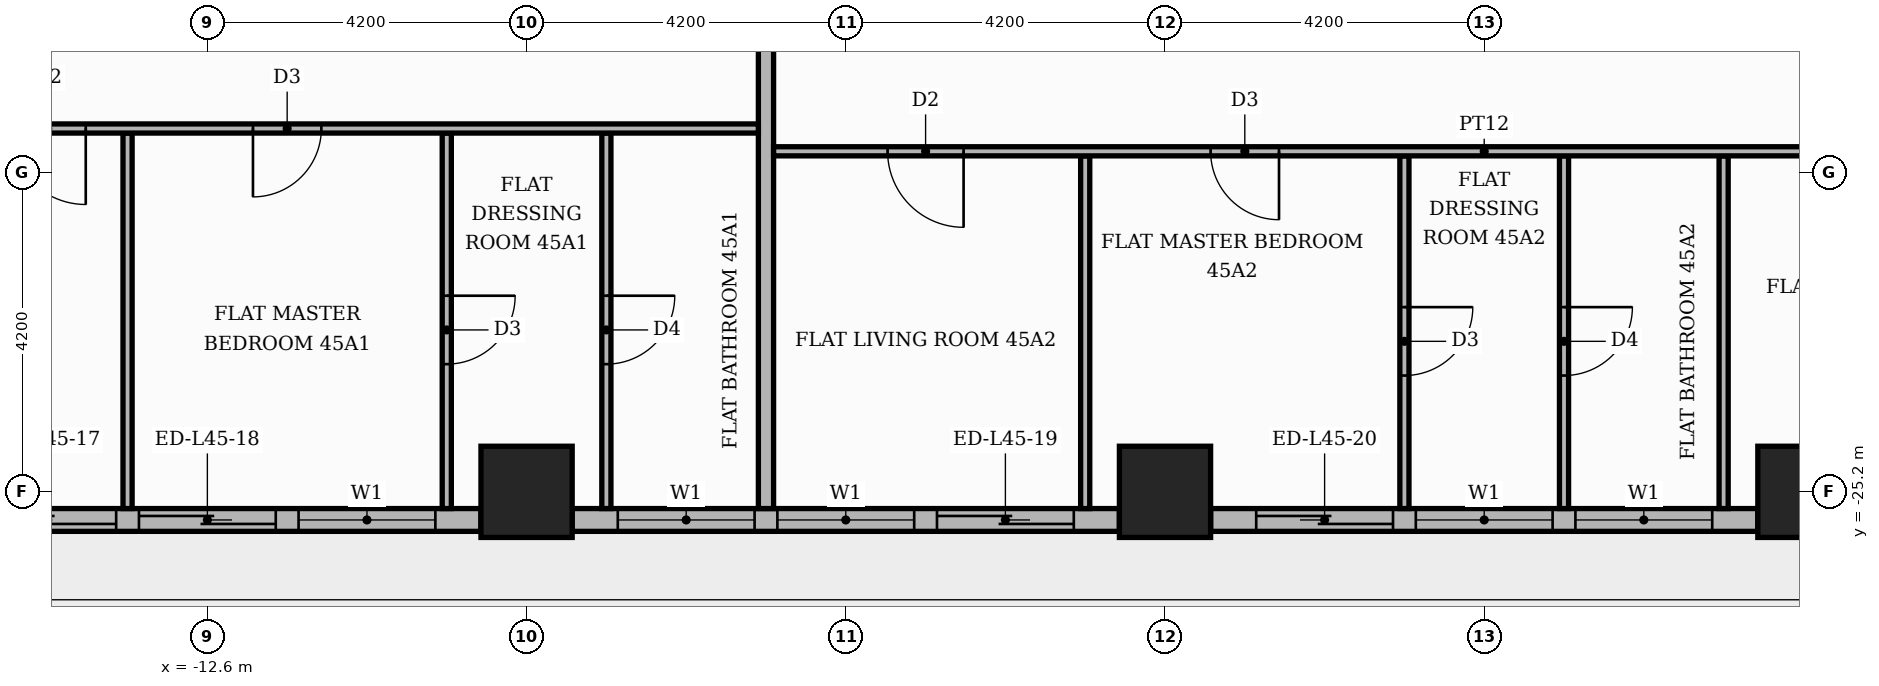
"""IFC4 building model, lengths in metres.
Left out: names, types, materials, properties, quantities, classifications, styles, units other than length and angle.
Written with IfcOpenShell. Run it as: python <this file> out.ifc"""

import sys

from ifc_helpers import new_model, si_unit, direction, frame, frame_2d, origin, origin_2d, place, context, subcontext, project, spatial, rectangle, extrude, element, fill, save


model = new_model("IFC4")
c1 = context("Model", 3, precision=1e-05, world=origin(), true_north=direction((0.0, 1.0)))
c2 = subcontext(c1, "Body", "Model", "MODEL_VIEW")
j1 = project(units=[si_unit("LENGTHUNIT", "METRE"), si_unit("PLANEANGLEUNIT", "RADIAN")], contexts=[c1])
p1 = place(None, origin())
s1 = spatial("IfcSite", under=j1, at=p1, CompositionType="ELEMENT")
p2 = place(p1, origin())
s2 = spatial("IfcBuilding", under=s1, at=p2, CompositionType="ELEMENT")
p3 = place(p2, frame((0.0, 0.0, 192.3)))
s3 = spatial("IfcBuildingStorey", under=s2, at=p3, CompositionType="ELEMENT", Elevation=192.3)
for number, where, z_axis, x_axis in (
    (1, (0.0, -25.2, 0.0), (0.0, 0.0, 1.0), (1.0, 0.0, 0.0)),
    (2, (8.4, -25.2, 0.0), (0.0, 0.0, 1.0), (1.0, 0.0, 0.0)),
    (3, (-8.4, -25.2, 0.0), (0.0, 0.0, 1.0), (1.0, 0.0, 0.0)),
):
    element("IfcColumn", number, at=place(p3, frame(where, z_axis=z_axis, x_axis=x_axis)), inside=s3, PredefinedType="COLUMN", context=c2, shape_type="SweptSolid", body=[
        extrude(rectangle(XDim=1.2, YDim=1.2, at=origin_2d()), origin(), (0.0, 0.0, 1.0), 3.9),
    ])
p4 = place(p3, frame((-16.2, -25.57, 0.0), z_axis=(0.0, 0.0, 1.0), x_axis=(1.0, 0.0, 0.0)))
e4 = element("IfcWall", 4, at=p4, inside=s3, PredefinedType="STANDARD", context=c2, shape_type="SweptSolid", body=[
    extrude(rectangle(XDim=7.2, YDim=0.3, at=frame_2d((3.6, 0.0))), origin(), (0.0, 0.0, 1.0), 3.48),
])
p5 = place(p4, frame((0.6, 0.0, 0.0)))
e5 = element("IfcOpeningElement", 5, at=p5, cuts=e4, PredefinedType="OPENING", context=c2, shape_type="SweptSolid", body=[
    extrude(rectangle(XDim=1.8, YDim=2.4, at=frame_2d((0.9, 1.2))), frame((0.0, 0.16, 0.0), z_axis=(0.0, -1.0, 0.0), x_axis=(1.0, 0.0, 0.0)), (0.0, 0.0, 1.0), 0.32),
])
p6 = place(p4, frame((2.7, 0.0, 0.0)))
e6 = element("IfcOpeningElement", 6, at=p6, cuts=e4, PredefinedType="OPENING", context=c2, shape_type="SweptSolid", body=[
    extrude(rectangle(XDim=1.8, YDim=2.4, at=frame_2d((0.9, 1.2))), frame((0.0, 0.16, 0.0), z_axis=(0.0, -1.0, 0.0), x_axis=(1.0, 0.0, 0.0)), (0.0, 0.0, 1.0), 0.32),
])
p7 = place(p4, frame((4.8, 0.0, 0.9)))
e7 = element("IfcOpeningElement", 7, at=p7, cuts=e4, PredefinedType="OPENING", context=c2, shape_type="SweptSolid", body=[
    extrude(rectangle(XDim=1.8, YDim=2.1, at=frame_2d((0.9, 1.05))), frame((0.0, 0.16, 0.0), z_axis=(0.0, -1.0, 0.0), x_axis=(1.0, 0.0, 0.0)), (0.0, 0.0, 1.0), 0.32),
])
p8 = place(p3, frame((-7.8, -25.57, 0.0), z_axis=(0.0, 0.0, 1.0), x_axis=(1.0, 0.0, 0.0)))
e8 = element("IfcWall", 8, at=p8, inside=s3, PredefinedType="STANDARD", context=c2, shape_type="SweptSolid", body=[
    extrude(rectangle(XDim=7.2, YDim=0.3, at=frame_2d((3.6, 0.0))), origin(), (0.0, 0.0, 1.0), 3.48),
])
p9 = place(p8, frame((0.6, 0.0, 0.9)))
e9 = element("IfcOpeningElement", 9, at=p9, cuts=e8, PredefinedType="OPENING", context=c2, shape_type="SweptSolid", body=[
    extrude(rectangle(XDim=1.8, YDim=2.1, at=frame_2d((0.9, 1.05))), frame((0.0, 0.16, 0.0), z_axis=(0.0, -1.0, 0.0), x_axis=(1.0, 0.0, 0.0)), (0.0, 0.0, 1.0), 0.32),
])
p10 = place(p8, frame((2.7, 0.0, 0.9)))
e10 = element("IfcOpeningElement", 10, at=p10, cuts=e8, PredefinedType="OPENING", context=c2, shape_type="SweptSolid", body=[
    extrude(rectangle(XDim=1.8, YDim=2.1, at=frame_2d((0.9, 1.05))), frame((0.0, 0.16, 0.0), z_axis=(0.0, -1.0, 0.0), x_axis=(1.0, 0.0, 0.0)), (0.0, 0.0, 1.0), 0.32),
])
p11 = place(p8, frame((4.8, 0.0, 0.0)))
e11 = element("IfcOpeningElement", 11, at=p11, cuts=e8, PredefinedType="OPENING", context=c2, shape_type="SweptSolid", body=[
    extrude(rectangle(XDim=1.8, YDim=2.4, at=frame_2d((0.9, 1.2))), frame((0.0, 0.16, 0.0), z_axis=(0.0, -1.0, 0.0), x_axis=(1.0, 0.0, 0.0)), (0.0, 0.0, 1.0), 0.32),
])
p12 = place(p3, frame((0.6, -25.57, 0.0), z_axis=(0.0, 0.0, 1.0), x_axis=(1.0, 0.0, 0.0)))
e12 = element("IfcWall", 12, at=p12, inside=s3, PredefinedType="STANDARD", context=c2, shape_type="SweptSolid", body=[
    extrude(rectangle(XDim=7.2, YDim=0.3, at=frame_2d((3.6, 0.0))), origin(), (0.0, 0.0, 1.0), 3.48),
])
p13 = place(p12, frame((0.6, 0.0, 0.0)))
e13 = element("IfcOpeningElement", 13, at=p13, cuts=e12, PredefinedType="OPENING", context=c2, shape_type="SweptSolid", body=[
    extrude(rectangle(XDim=1.8, YDim=2.4, at=frame_2d((0.9, 1.2))), frame((0.0, 0.16, 0.0), z_axis=(0.0, -1.0, 0.0), x_axis=(1.0, 0.0, 0.0)), (0.0, 0.0, 1.0), 0.32),
])
p14 = place(p12, frame((2.7, 0.0, 0.9)))
e14 = element("IfcOpeningElement", 14, at=p14, cuts=e12, PredefinedType="OPENING", context=c2, shape_type="SweptSolid", body=[
    extrude(rectangle(XDim=1.8, YDim=2.1, at=frame_2d((0.9, 1.05))), frame((0.0, 0.16, 0.0), z_axis=(0.0, -1.0, 0.0), x_axis=(1.0, 0.0, 0.0)), (0.0, 0.0, 1.0), 0.32),
])
p15 = place(p12, frame((4.8, 0.0, 0.9)))
e15 = element("IfcOpeningElement", 15, at=p15, cuts=e12, PredefinedType="OPENING", context=c2, shape_type="SweptSolid", body=[
    extrude(rectangle(XDim=1.8, YDim=2.1, at=frame_2d((0.9, 1.05))), frame((0.0, 0.16, 0.0), z_axis=(0.0, -1.0, 0.0), x_axis=(1.0, 0.0, 0.0)), (0.0, 0.0, 1.0), 0.32),
])
p16 = place(p3, frame((-13.65, -25.42, 0.0), z_axis=(0.0, 0.0, 1.0), x_axis=(0.0, 1.0, 0.0)))
e16 = element("IfcWall", 16, at=p16, inside=s3, PredefinedType="PARTITIONING", context=c2, shape_type="SweptSolid", body=[
    extrude(rectangle(XDim=4.94, YDim=0.12, at=frame_2d((2.47, 0.0))), origin(), (0.0, 0.0, 1.0), 3.48),
])
p17 = place(p3, frame((-9.45, -25.42, 0.0), z_axis=(0.0, 0.0, 1.0), x_axis=(0.0, 1.0, 0.0)))
e17 = element("IfcWall", 17, at=p17, inside=s3, PredefinedType="PARTITIONING", context=c2, shape_type="SweptSolid", body=[
    extrude(rectangle(XDim=4.94, YDim=0.12, at=frame_2d((2.47, 0.0))), origin(), (0.0, 0.0, 1.0), 3.48),
])
p18 = place(p17, frame((1.9, 0.0, 0.0)))
e18 = element("IfcOpeningElement", 18, at=p18, cuts=e17, PredefinedType="OPENING", context=c2, shape_type="SweptSolid", body=[
    extrude(rectangle(XDim=0.9, YDim=2.1, at=frame_2d((0.45, 1.05))), frame((0.0, 0.07, 0.0), z_axis=(0.0, -1.0, 0.0), x_axis=(1.0, 0.0, 0.0)), (0.0, 0.0, 1.0), 0.14),
])
p19 = place(p3, frame((-7.35, -25.42, 0.0), z_axis=(0.0, 0.0, 1.0), x_axis=(0.0, 1.0, 0.0)))
e19 = element("IfcWall", 19, at=p19, inside=s3, PredefinedType="PARTITIONING", context=c2, shape_type="SweptSolid", body=[
    extrude(rectangle(XDim=4.94, YDim=0.12, at=frame_2d((2.47, 0.0))), origin(), (0.0, 0.0, 1.0), 3.48),
])
p20 = place(p19, frame((1.9, 0.0, 0.0)))
e20 = element("IfcOpeningElement", 20, at=p20, cuts=e19, PredefinedType="OPENING", context=c2, shape_type="SweptSolid", body=[
    extrude(rectangle(XDim=0.9, YDim=2.1, at=frame_2d((0.45, 1.05))), frame((0.0, 0.07, 0.0), z_axis=(0.0, -1.0, 0.0), x_axis=(1.0, 0.0, 0.0)), (0.0, 0.0, 1.0), 0.14),
])
p21 = place(p3, frame((-5.25, -25.42, 0.0), z_axis=(0.0, 0.0, 1.0), x_axis=(0.0, 1.0, 0.0)))
e21 = element("IfcWall", 21, at=p21, inside=s3, PredefinedType="PARTITIONING", context=c2, shape_type="SweptSolid", body=[
    extrude(rectangle(XDim=11.67, YDim=0.2, at=frame_2d((5.835, 0.0))), origin(), (0.0, 0.0, 1.0), 3.48),
])
p22 = place(p3, frame((-1.05, -25.42, 0.0), z_axis=(0.0, 0.0, 1.0), x_axis=(0.0, 1.0, 0.0)))
e22 = element("IfcWall", 22, at=p22, inside=s3, PredefinedType="PARTITIONING", context=c2, shape_type="SweptSolid", body=[
    extrude(rectangle(XDim=4.64, YDim=0.12, at=frame_2d((2.32, 0.0))), origin(), (0.0, 0.0, 1.0), 3.48),
])
p23 = place(p3, frame((3.15, -25.42, 0.0), z_axis=(0.0, 0.0, 1.0), x_axis=(0.0, 1.0, 0.0)))
e23 = element("IfcWall", 23, at=p23, inside=s3, PredefinedType="PARTITIONING", context=c2, shape_type="SweptSolid", body=[
    extrude(rectangle(XDim=4.64, YDim=0.12, at=frame_2d((2.32, 0.0))), origin(), (0.0, 0.0, 1.0), 3.48),
])
p24 = place(p23, frame((1.75, 0.0, 0.0)))
e24 = element("IfcOpeningElement", 24, at=p24, cuts=e23, PredefinedType="OPENING", context=c2, shape_type="SweptSolid", body=[
    extrude(rectangle(XDim=0.9, YDim=2.1, at=frame_2d((0.45, 1.05))), frame((0.0, 0.07, 0.0), z_axis=(0.0, -1.0, 0.0), x_axis=(1.0, 0.0, 0.0)), (0.0, 0.0, 1.0), 0.14),
])
p25 = place(p3, frame((5.25, -25.42, 0.0), z_axis=(0.0, 0.0, 1.0), x_axis=(0.0, 1.0, 0.0)))
e25 = element("IfcWall", 25, at=p25, inside=s3, PredefinedType="PARTITIONING", context=c2, shape_type="SweptSolid", body=[
    extrude(rectangle(XDim=4.64, YDim=0.12, at=frame_2d((2.32, 0.0))), origin(), (0.0, 0.0, 1.0), 3.48),
])
p26 = place(p25, frame((1.75, 0.0, 0.0)))
e26 = element("IfcOpeningElement", 26, at=p26, cuts=e25, PredefinedType="OPENING", context=c2, shape_type="SweptSolid", body=[
    extrude(rectangle(XDim=0.9, YDim=2.1, at=frame_2d((0.45, 1.05))), frame((0.0, 0.07, 0.0), z_axis=(0.0, -1.0, 0.0), x_axis=(1.0, 0.0, 0.0)), (0.0, 0.0, 1.0), 0.14),
])
p27 = place(p3, frame((7.35, -25.42, 0.0), z_axis=(0.0, 0.0, 1.0), x_axis=(0.0, 1.0, 0.0)))
e27 = element("IfcWall", 27, at=p27, inside=s3, PredefinedType="PARTITIONING", context=c2, shape_type="SweptSolid", body=[
    extrude(rectangle(XDim=4.64, YDim=0.12, at=frame_2d((2.32, 0.0))), origin(), (0.0, 0.0, 1.0), 3.48),
])
p28 = place(p3, frame((-5.15, -20.72, 0.0), z_axis=(0.0, 0.0, 1.0), x_axis=(1.0, 0.0, 0.0)))
e28 = element("IfcWall", 28, at=p28, inside=s3, PredefinedType="PARTITIONING", context=c2, shape_type="SweptSolid", body=[
    extrude(rectangle(XDim=18.7, YDim=0.12, at=frame_2d((9.35, 0.0))), origin(), (0.0, 0.0, 1.0), 3.48),
])
p29 = place(p28, frame((1.5, 0.0, 0.0)))
e29 = element("IfcOpeningElement", 29, at=p29, cuts=e28, PredefinedType="OPENING", context=c2, shape_type="SweptSolid", body=[
    extrude(rectangle(XDim=1.0, YDim=2.1, at=frame_2d((0.5, 1.05))), frame((0.0, 0.07, 0.0), z_axis=(0.0, -1.0, 0.0), x_axis=(1.0, 0.0, 0.0)), (0.0, 0.0, 1.0), 0.14),
])
p30 = place(p28, frame((5.75, 0.0, 0.0)))
e30 = element("IfcOpeningElement", 30, at=p30, cuts=e28, PredefinedType="OPENING", context=c2, shape_type="SweptSolid", body=[
    extrude(rectangle(XDim=0.9, YDim=2.1, at=frame_2d((0.45, 1.05))), frame((0.0, 0.07, 0.0), z_axis=(0.0, -1.0, 0.0), x_axis=(1.0, 0.0, 0.0)), (0.0, 0.0, 1.0), 0.14),
])
p31 = place(p28, frame((14.15, 0.0, 0.0)))
e31 = element("IfcOpeningElement", 31, at=p31, cuts=e28, PredefinedType="OPENING", context=c2, shape_type="SweptSolid", body=[
    extrude(rectangle(XDim=0.9, YDim=2.1, at=frame_2d((0.45, 1.05))), frame((0.0, 0.07, 0.0), z_axis=(0.0, -1.0, 0.0), x_axis=(1.0, 0.0, 0.0)), (0.0, 0.0, 1.0), 0.14),
])
p32 = place(p3, frame((-21.219, -20.42, 0.0), z_axis=(0.0, 0.0, 1.0), x_axis=(1.0, 0.0, 0.0)))
e32 = element("IfcWall", 32, at=p32, inside=s3, PredefinedType="PARTITIONING", context=c2, shape_type="SweptSolid", body=[
    extrude(rectangle(XDim=15.869, YDim=0.12, at=frame_2d((7.935, 0.0))), origin(), (0.0, 0.0, 1.0), 3.48),
])
p33 = place(p32, frame((6.019, 0.0, 0.0)))
e33 = element("IfcOpeningElement", 33, at=p33, cuts=e32, PredefinedType="OPENING", context=c2, shape_type="SweptSolid", body=[
    extrude(rectangle(XDim=1.0, YDim=2.1, at=frame_2d((0.5, 1.05))), frame((0.0, 0.07, 0.0), z_axis=(0.0, -1.0, 0.0), x_axis=(1.0, 0.0, 0.0)), (0.0, 0.0, 1.0), 0.14),
])
p34 = place(p32, frame((9.219, 0.0, 0.0)))
e34 = element("IfcOpeningElement", 34, at=p34, cuts=e32, PredefinedType="OPENING", context=c2, shape_type="SweptSolid", body=[
    extrude(rectangle(XDim=0.9, YDim=2.1, at=frame_2d((0.45, 1.05))), frame((0.0, 0.07, 0.0), z_axis=(0.0, -1.0, 0.0), x_axis=(1.0, 0.0, 0.0)), (0.0, 0.0, 1.0), 0.14),
])
p35 = place(p5, origin())
e35 = element("IfcDoor", 35, at=p35, inside=s3, OperationType="SLIDING_TO_LEFT", PredefinedType="DOOR", context=c2, shape_type="SweptSolid", body=[
    extrude(rectangle(XDim=1.8, YDim=2.4, at=frame_2d((0.9, 1.2))), frame((0.0, 0.025, 0.0), z_axis=(0.0, -1.0, 0.0), x_axis=(1.0, 0.0, 0.0)), (0.0, 0.0, 1.0), 0.05),
])
fill(e5, e35)
p36 = place(p6, origin())
e36 = element("IfcDoor", 36, at=p36, inside=s3, OperationType="SLIDING_TO_RIGHT", PredefinedType="DOOR", context=c2, shape_type="SweptSolid", body=[
    extrude(rectangle(XDim=1.8, YDim=2.4, at=frame_2d((0.9, 1.2))), frame((0.0, 0.025, 0.0), z_axis=(0.0, -1.0, 0.0), x_axis=(1.0, 0.0, 0.0)), (0.0, 0.0, 1.0), 0.05),
])
fill(e6, e36)
p37 = place(p7, origin())
e37 = element("IfcWindow", 37, at=p37, inside=s3, PartitioningType="SINGLE_PANEL", PredefinedType="WINDOW", context=c2, shape_type="SweptSolid", body=[
    extrude(rectangle(XDim=1.8, YDim=2.1, at=frame_2d((0.9, 1.05))), frame((0.0, 0.03, 0.0), z_axis=(0.0, -1.0, 0.0), x_axis=(1.0, 0.0, 0.0)), (0.0, 0.0, 1.0), 0.06),
])
fill(e7, e37)
p38 = place(p9, origin())
e38 = element("IfcWindow", 38, at=p38, inside=s3, PartitioningType="SINGLE_PANEL", PredefinedType="WINDOW", context=c2, shape_type="SweptSolid", body=[
    extrude(rectangle(XDim=1.8, YDim=2.1, at=frame_2d((0.9, 1.05))), frame((0.0, 0.03, 0.0), z_axis=(0.0, -1.0, 0.0), x_axis=(1.0, 0.0, 0.0)), (0.0, 0.0, 1.0), 0.06),
])
fill(e9, e38)
p39 = place(p10, origin())
e39 = element("IfcWindow", 39, at=p39, inside=s3, PartitioningType="SINGLE_PANEL", PredefinedType="WINDOW", context=c2, shape_type="SweptSolid", body=[
    extrude(rectangle(XDim=1.8, YDim=2.1, at=frame_2d((0.9, 1.05))), frame((0.0, 0.03, 0.0), z_axis=(0.0, -1.0, 0.0), x_axis=(1.0, 0.0, 0.0)), (0.0, 0.0, 1.0), 0.06),
])
fill(e10, e39)
p40 = place(p11, origin())
e40 = element("IfcDoor", 40, at=p40, inside=s3, OperationType="SLIDING_TO_RIGHT", PredefinedType="DOOR", context=c2, shape_type="SweptSolid", body=[
    extrude(rectangle(XDim=1.8, YDim=2.4, at=frame_2d((0.9, 1.2))), frame((0.0, 0.025, 0.0), z_axis=(0.0, -1.0, 0.0), x_axis=(1.0, 0.0, 0.0)), (0.0, 0.0, 1.0), 0.05),
])
fill(e11, e40)
p41 = place(p13, origin())
e41 = element("IfcDoor", 41, at=p41, inside=s3, OperationType="SLIDING_TO_LEFT", PredefinedType="DOOR", context=c2, shape_type="SweptSolid", body=[
    extrude(rectangle(XDim=1.8, YDim=2.4, at=frame_2d((0.9, 1.2))), frame((0.0, 0.025, 0.0), z_axis=(0.0, -1.0, 0.0), x_axis=(1.0, 0.0, 0.0)), (0.0, 0.0, 1.0), 0.05),
])
fill(e13, e41)
p42 = place(p14, origin())
e42 = element("IfcWindow", 42, at=p42, inside=s3, PartitioningType="SINGLE_PANEL", PredefinedType="WINDOW", context=c2, shape_type="SweptSolid", body=[
    extrude(rectangle(XDim=1.8, YDim=2.1, at=frame_2d((0.9, 1.05))), frame((0.0, 0.03, 0.0), z_axis=(0.0, -1.0, 0.0), x_axis=(1.0, 0.0, 0.0)), (0.0, 0.0, 1.0), 0.06),
])
fill(e14, e42)
p43 = place(p15, origin())
e43 = element("IfcWindow", 43, at=p43, inside=s3, PartitioningType="SINGLE_PANEL", PredefinedType="WINDOW", context=c2, shape_type="SweptSolid", body=[
    extrude(rectangle(XDim=1.8, YDim=2.1, at=frame_2d((0.9, 1.05))), frame((0.0, 0.03, 0.0), z_axis=(0.0, -1.0, 0.0), x_axis=(1.0, 0.0, 0.0)), (0.0, 0.0, 1.0), 0.06),
])
fill(e15, e43)
p44 = place(p33, frame((1.0, 0.0, 0.0), z_axis=(0.0, 0.0, 1.0), x_axis=(-1.0, 0.0, 0.0)))
e44 = element("IfcDoor", 44, at=p44, inside=s3, OperationType="SINGLE_SWING_RIGHT", PredefinedType="DOOR", context=c2, shape_type="SweptSolid", body=[
    extrude(rectangle(XDim=1.0, YDim=2.1, at=frame_2d((0.5, 1.05))), frame((0.0, 0.025, 0.0), z_axis=(0.0, -1.0, 0.0), x_axis=(1.0, 0.0, 0.0)), (0.0, 0.0, 1.0), 0.05),
])
fill(e33, e44)
p45 = place(p34, frame((0.9, 0.0, 0.0), z_axis=(0.0, 0.0, 1.0), x_axis=(-1.0, 0.0, 0.0)))
e45 = element("IfcDoor", 45, at=p45, inside=s3, OperationType="SINGLE_SWING_LEFT", PredefinedType="DOOR", context=c2, shape_type="SweptSolid", body=[
    extrude(rectangle(XDim=0.9, YDim=2.1, at=frame_2d((0.45, 1.05))), frame((0.0, 0.025, 0.0), z_axis=(0.0, -1.0, 0.0), x_axis=(1.0, 0.0, 0.0)), (0.0, 0.0, 1.0), 0.05),
])
fill(e34, e45)
p46 = place(p18, frame((0.9, 0.0, 0.0), z_axis=(0.0, 0.0, 1.0), x_axis=(-1.0, 0.0, 0.0)))
e46 = element("IfcDoor", 46, at=p46, inside=s3, OperationType="SINGLE_SWING_RIGHT", PredefinedType="DOOR", context=c2, shape_type="SweptSolid", body=[
    extrude(rectangle(XDim=0.9, YDim=2.1, at=frame_2d((0.45, 1.05))), frame((0.0, 0.025, 0.0), z_axis=(0.0, -1.0, 0.0), x_axis=(1.0, 0.0, 0.0)), (0.0, 0.0, 1.0), 0.05),
])
fill(e18, e46)
p47 = place(p20, frame((0.9, 0.0, 0.0), z_axis=(0.0, 0.0, 1.0), x_axis=(-1.0, 0.0, 0.0)))
e47 = element("IfcDoor", 47, at=p47, inside=s3, OperationType="SINGLE_SWING_RIGHT", PredefinedType="DOOR", context=c2, shape_type="SweptSolid", body=[
    extrude(rectangle(XDim=0.9, YDim=2.1, at=frame_2d((0.45, 1.05))), frame((0.0, 0.025, 0.0), z_axis=(0.0, -1.0, 0.0), x_axis=(1.0, 0.0, 0.0)), (0.0, 0.0, 1.0), 0.05),
])
fill(e20, e47)
p48 = place(p29, frame((1.0, 0.0, 0.0), z_axis=(0.0, 0.0, 1.0), x_axis=(-1.0, 0.0, 0.0)))
e48 = element("IfcDoor", 48, at=p48, inside=s3, OperationType="SINGLE_SWING_RIGHT", PredefinedType="DOOR", context=c2, shape_type="SweptSolid", body=[
    extrude(rectangle(XDim=1.0, YDim=2.1, at=frame_2d((0.5, 1.05))), frame((0.0, 0.025, 0.0), z_axis=(0.0, -1.0, 0.0), x_axis=(1.0, 0.0, 0.0)), (0.0, 0.0, 1.0), 0.05),
])
fill(e29, e48)
p49 = place(p30, frame((0.9, 0.0, 0.0), z_axis=(0.0, 0.0, 1.0), x_axis=(-1.0, 0.0, 0.0)))
e49 = element("IfcDoor", 49, at=p49, inside=s3, OperationType="SINGLE_SWING_RIGHT", PredefinedType="DOOR", context=c2, shape_type="SweptSolid", body=[
    extrude(rectangle(XDim=0.9, YDim=2.1, at=frame_2d((0.45, 1.05))), frame((0.0, 0.025, 0.0), z_axis=(0.0, -1.0, 0.0), x_axis=(1.0, 0.0, 0.0)), (0.0, 0.0, 1.0), 0.05),
])
fill(e30, e49)
p50 = place(p24, frame((0.9, 0.0, 0.0), z_axis=(0.0, 0.0, 1.0), x_axis=(-1.0, 0.0, 0.0)))
e50 = element("IfcDoor", 50, at=p50, inside=s3, OperationType="SINGLE_SWING_RIGHT", PredefinedType="DOOR", context=c2, shape_type="SweptSolid", body=[
    extrude(rectangle(XDim=0.9, YDim=2.1, at=frame_2d((0.45, 1.05))), frame((0.0, 0.025, 0.0), z_axis=(0.0, -1.0, 0.0), x_axis=(1.0, 0.0, 0.0)), (0.0, 0.0, 1.0), 0.05),
])
fill(e24, e50)
p51 = place(p26, frame((0.9, 0.0, 0.0), z_axis=(0.0, 0.0, 1.0), x_axis=(-1.0, 0.0, 0.0)))
e51 = element("IfcDoor", 51, at=p51, inside=s3, OperationType="SINGLE_SWING_RIGHT", PredefinedType="DOOR", context=c2, shape_type="SweptSolid", body=[
    extrude(rectangle(XDim=0.9, YDim=2.1, at=frame_2d((0.45, 1.05))), frame((0.0, 0.025, 0.0), z_axis=(0.0, -1.0, 0.0), x_axis=(1.0, 0.0, 0.0)), (0.0, 0.0, 1.0), 0.05),
])
fill(e26, e51)
save(model, sys.argv[1])
